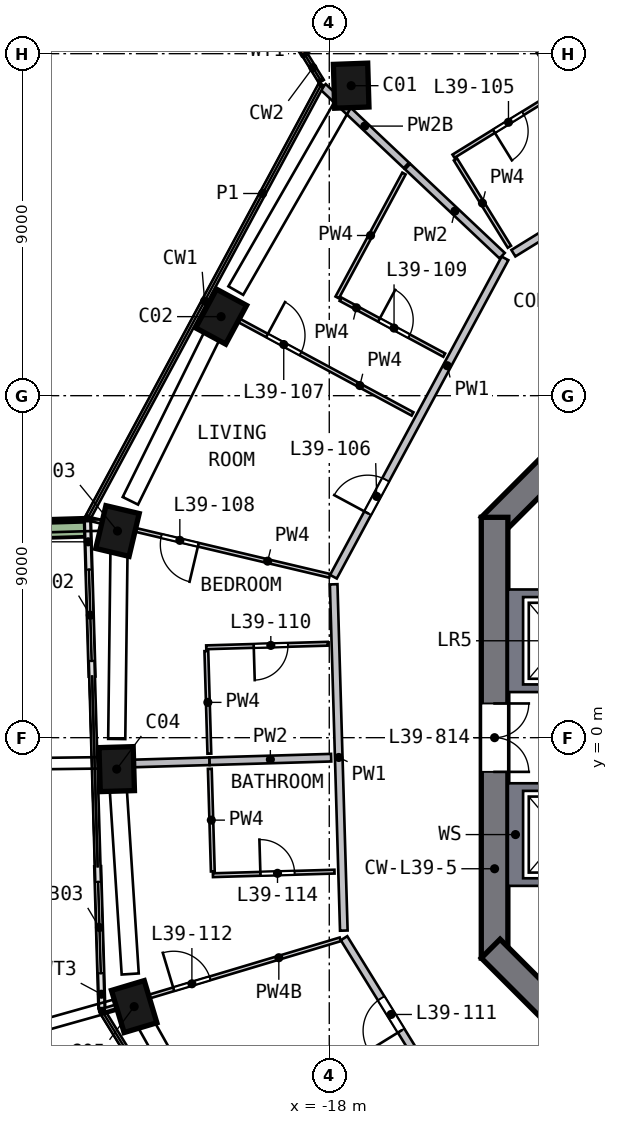
"""IFC4 building model, lengths in metres.
Left out: names, types, materials, properties, quantities, classifications, styles, units other than length and angle.
Written with IfcOpenShell. Run it as: python <this file> out.ifc"""

import sys

from ifc_helpers import new_model, si_unit, direction, frame, frame_2d, origin, origin_2d, place, context, subcontext, project, spatial, polyline, rectangle, outline, extrude, element, fill, save


model = new_model("IFC4")
c1 = context("Model", 3, precision=1e-05, world=origin(), true_north=direction((0.0, 1.0)))
c2 = subcontext(c1, "Body", "Model", "MODEL_VIEW")
j1 = project(units=[si_unit("LENGTHUNIT", "METRE"), si_unit("PLANEANGLEUNIT", "RADIAN")], contexts=[c1])
p1 = place(None, origin())
s1 = spatial("IfcSite", under=j1, at=p1, CompositionType="ELEMENT")
p2 = place(p1, origin())
s2 = spatial("IfcBuilding", under=s1, at=p2, CompositionType="ELEMENT")
p3 = place(p2, frame((0.0, 0.0, 162.0)))
s3 = spatial("IfcBuildingStorey", under=s2, at=p3, CompositionType="ELEMENT", Elevation=162.0)
p4 = place(p3, frame((-17.325, 17.258, 0.0), z_axis=(-0.081337026, -0.083009376, 0.993223908), x_axis=(-0.035851869, 0.996124497, 0.080315816)))
e1 = element("IfcColumn", 1, at=p4, inside=s3, PredefinedType="COLUMN", context=c2, shape_type="SweptSolid", body=[
    extrude(rectangle(XDim=1.15, YDim=0.9, at=origin_2d()), origin(), (0.0, 0.0, 1.0), 3.212),
])
p5 = place(p3, frame((-20.783, 11.2, 0.0), z_axis=(-0.052474579, -0.09932145, 0.993670805), x_axis=(-0.471622943, -0.874616696, -0.112327356)))
e2 = element("IfcColumn", 2, at=p5, inside=s3, PredefinedType="COLUMN", context=c2, shape_type="SweptSolid", body=[
    extrude(rectangle(XDim=1.15, YDim=0.9, at=origin_2d()), origin(), (0.0, 0.0, 1.0), 3.21),
])
p6 = place(p3, frame((-23.542, 5.574, 0.0), z_axis=(-0.025544734, -0.112214366, 0.993355627), x_axis=(0.228704033, 0.966669959, 0.115081082)))
e3 = element("IfcColumn", 3, at=p6, inside=s3, PredefinedType="COLUMN", context=c2, shape_type="SweptSolid", body=[
    extrude(rectangle(XDim=1.15, YDim=0.9, at=origin_2d()), origin(), (0.0, 0.0, 1.0), 3.211),
])
p7 = place(p3, frame((-23.598, -0.692, 0.0), z_axis=(0.004182758, -0.112250014, 0.993671193), x_axis=(0.02857431, -0.993260713, -0.112323925)))
e4 = element("IfcColumn", 4, at=p7, inside=s3, PredefinedType="COLUMN", context=c2, shape_type="SweptSolid", body=[
    extrude(rectangle(XDim=1.15, YDim=0.9, at=origin_2d()), origin(), (0.0, 0.0, 1.0), 3.21),
])
p8 = place(p3, frame((-23.175, -6.944, 0.0), z_axis=(0.033983692, -0.109933824, 0.993357772), x_axis=(-0.285309883, 0.951503482, 0.115062571)))
e5 = element("IfcColumn", 5, at=p8, inside=s3, PredefinedType="COLUMN", context=c2, shape_type="SweptSolid", body=[
    extrude(rectangle(XDim=1.15, YDim=0.9, at=origin_2d()), origin(), (0.0, 0.0, 1.0), 3.211),
])
p9 = place(p3, frame((-5.552, 13.752, 0.0), z_axis=(0.0, 0.0, 1.0), x_axis=(-0.707106781, -0.707106781, 0.0)))
e6 = element("IfcWall", 6, at=p9, inside=s3, PredefinedType="SHEAR", context=c2, shape_type="SweptSolid", body=[
    extrude(rectangle(XDim=11.598, YDim=0.7, at=frame_2d((5.799, 0.0))), origin(), (0.0, 0.0, 1.0), 3.5),
])
p10 = place(p3, frame((-13.65, 5.799, 0.0), z_axis=(0.0, 0.0, 1.0), x_axis=(0.0, -1.0, 0.0)))
e7 = element("IfcWall", 7, at=p10, inside=s3, PredefinedType="SHEAR", context=c2, shape_type="SweptSolid", body=[
    extrude(rectangle(XDim=11.598, YDim=0.7, at=frame_2d((5.799, 0.0))), origin(), (0.0, 0.0, 1.0), 3.5),
])
p11 = place(p10, frame((4.899, 0.0, 0.0)))
e8 = element("IfcOpeningElement", 8, at=p11, cuts=e7, PredefinedType="OPENING", context=c2, shape_type="SweptSolid", body=[
    extrude(rectangle(XDim=1.8, YDim=2.1, at=frame_2d((0.9, 1.05))), frame((0.0, 0.36, 0.0), z_axis=(0.0, -1.0, 0.0), x_axis=(1.0, 0.0, 0.0)), (0.0, 0.0, 1.0), 0.72),
])
p12 = place(p3, frame((-13.752, -5.552, 0.0), z_axis=(0.0, 0.0, 1.0), x_axis=(0.707106781, -0.707106781, 0.0)))
e9 = element("IfcWall", 9, at=p12, inside=s3, PredefinedType="SHEAR", context=c2, shape_type="SweptSolid", body=[
    extrude(rectangle(XDim=11.598, YDim=0.7, at=frame_2d((5.799, 0.0))), origin(), (0.0, 0.0, 1.0), 3.5),
])
p13 = place(p12, frame((2.099, 0.0, 0.0)))
e10 = element("IfcOpeningElement", 10, at=p13, cuts=e9, PredefinedType="OPENING", context=c2, shape_type="SweptSolid", body=[
    extrude(rectangle(XDim=1.2, YDim=2.1, at=frame_2d((0.6, 1.05))), frame((0.0, 0.36, 0.0), z_axis=(0.0, -1.0, 0.0), x_axis=(1.0, 0.0, 0.0)), (0.0, 0.0, 1.0), 0.72),
])
p14 = place(p3, frame((-17.161, 19.002, 0.0), z_axis=(0.0, 0.0, 1.0), x_axis=(-0.851027347, -0.525121372, 0.0)))
e11 = element("IfcWall", 11, at=p14, inside=s3, PredefinedType="SOLIDWALL", context=c2, shape_type="SweptSolid", body=[
    extrude(rectangle(XDim=1.875, YDim=0.15, at=frame_2d((0.938, 0.0))), origin(), (0.0, 0.0, 1.0), 3.19),
])
p15 = place(p3, frame((-24.361, 5.688, 0.0), z_axis=(0.0, 0.0, 1.0), x_axis=(0.029349666, -0.999569206, 0.0)))
e12 = element("IfcWall", 12, at=p15, inside=s3, PredefinedType="SOLIDWALL", context=c2, shape_type="SweptSolid", body=[
    extrude(rectangle(XDim=4.068, YDim=0.15, at=frame_2d((2.034, 0.0))), origin(), (0.0, 0.0, 1.0), 2.475),
])
p16 = place(p15, frame((1.268, 0.0, 0.0)))
e13 = element("IfcOpeningElement", 13, at=p16, cuts=e12, PredefinedType="OPENING", context=c2, shape_type="SweptSolid", body=[
    extrude(rectangle(XDim=2.4, YDim=2.4, at=frame_2d((1.2, 1.2))), frame((0.0, 0.085, 0.0), z_axis=(0.0, -1.0, 0.0), x_axis=(1.0, 0.0, 0.0)), (0.0, 0.0, 1.0), 0.17),
])
p17 = place(p3, frame((-24.094, -3.397, 0.0), z_axis=(0.0, 0.0, 1.0), x_axis=(0.029283026, -0.99957116, 0.0)))
e14 = element("IfcWall", 14, at=p17, inside=s3, PredefinedType="SOLIDWALL", context=c2, shape_type="SweptSolid", body=[
    extrude(rectangle(XDim=3.71, YDim=0.15, at=frame_2d((1.855, 0.0))), origin(), (0.0, 0.0, 1.0), 2.475),
])
p18 = place(p17, frame((0.4, 0.0, 0.0)))
e15 = element("IfcOpeningElement", 15, at=p18, cuts=e14, PredefinedType="OPENING", context=c2, shape_type="SweptSolid", body=[
    extrude(rectangle(XDim=2.4, YDim=2.4, at=frame_2d((1.2, 1.2))), frame((0.0, 0.085, 0.0), z_axis=(0.0, -1.0, 0.0), x_axis=(1.0, 0.0, 0.0)), (0.0, 0.0, 1.0), 0.17),
])
p19 = place(p3, frame((-24.432, 5.536, 0.0), z_axis=(0.0, 0.0, 1.0), x_axis=(-0.99957052, -0.029304862, 0.0)))
e16 = element("IfcWall", 16, at=p19, inside=s3, PredefinedType="SOLIDWALL", context=c2, shape_type="SweptSolid", body=[
    extrude(rectangle(XDim=3.199, YDim=0.5, at=frame_2d((1.6, 0.0))), origin(), (0.0, 0.0, 1.0), 0.7),
])
p20 = place(p3, frame((-26.948, -8.142, 0.0), z_axis=(0.0, 0.0, 1.0), x_axis=(0.525181892, -0.85099, 0.0)))
e17 = element("IfcWall", 17, at=p20, inside=s3, PredefinedType="SOLIDWALL", context=c2, shape_type="SweptSolid", body=[
    extrude(rectangle(XDim=13.723, YDim=0.5, at=frame_2d((6.862, 0.0))), origin(), (0.0, 0.0, 1.0), 0.7),
])
p21 = place(p3, origin())
e18 = element("IfcWall", 18, at=p21, inside=s3, PredefinedType="SOLIDWALL", context=c2, shape_type="SweptSolid", body=[
    extrude(outline(polyline([(-13.3, 3.9), (-10.9, 3.9), (-10.9, 3.7), (-12.9, 3.7), (-12.9, 1.4), (-10.9, 1.4), (-10.9, 1.2), (-13.3, 1.2), (-13.3, 3.9)])), origin(), (0.0, 0.0, 1.0), 3.19),
])
p22 = place(p3, origin())
e19 = element("IfcWall", 19, at=p22, inside=s3, PredefinedType="SOLIDWALL", context=c2, shape_type="SweptSolid", body=[
    extrude(outline(polyline([(-13.3, -3.9), (-13.3, -1.2), (-10.9, -1.2), (-10.9, -1.4), (-12.9, -1.4), (-12.9, -3.7), (-10.9, -3.7), (-10.9, -3.9), (-13.3, -3.9)])), origin(), (0.0, 0.0, 1.0), 3.19),
])
p23 = place(p3, frame((-17.884, 4.036, 0.0), z_axis=(0.0, 0.0, 1.0), x_axis=(0.029297532, -0.999570735, 0.0)))
e20 = element("IfcWall", 20, at=p23, inside=s3, PredefinedType="SOLIDWALL", context=c2, shape_type="SweptSolid", body=[
    extrude(rectangle(XDim=9.116, YDim=0.2, at=frame_2d((4.558, 0.0))), origin(), (0.0, 0.0, 1.0), 3.19),
])
p24 = place(p3, frame((-17.89, 4.236, 0.0), z_axis=(0.0, 0.0, 1.0), x_axis=(0.474391993, 0.880313715, 0.0)))
e21 = element("IfcWall", 21, at=p24, inside=s3, PredefinedType="SOLIDWALL", context=c2, shape_type="SweptSolid", body=[
    extrude(rectangle(XDim=9.517, YDim=0.2, at=frame_2d((4.758, 0.0))), origin(), (0.0, 0.0, 1.0), 3.19),
])
p25 = place(p24, frame((1.9, 0.0, 0.0)))
e22 = element("IfcOpeningElement", 22, at=p25, cuts=e21, PredefinedType="OPENING", context=c2, shape_type="SweptSolid", body=[
    extrude(rectangle(XDim=1.0, YDim=2.1, at=frame_2d((0.5, 1.05))), frame((0.0, 0.11, 0.0), z_axis=(0.0, -1.0, 0.0), x_axis=(1.0, 0.0, 0.0)), (0.0, 0.0, 1.0), 0.22),
])
p26 = place(p3, frame((-12.613, -13.375, 0.0), z_axis=(0.0, 0.0, 1.0), x_axis=(-0.525166229, 0.850999666, 0.0)))
e23 = element("IfcWall", 23, at=p26, inside=s3, PredefinedType="SOLIDWALL", context=c2, shape_type="SweptSolid", body=[
    extrude(rectangle(XDim=9.517, YDim=0.2, at=frame_2d((4.758, 0.0))), origin(), (0.0, 0.0, 1.0), 3.19),
])
p27 = place(p26, frame((6.658, 0.0, 0.0)))
e24 = element("IfcOpeningElement", 24, at=p27, cuts=e23, PredefinedType="OPENING", context=c2, shape_type="SweptSolid", body=[
    extrude(rectangle(XDim=1.0, YDim=2.1, at=frame_2d((0.5, 1.05))), frame((0.0, 0.11, 0.0), z_axis=(0.0, -1.0, 0.0), x_axis=(1.0, 0.0, 0.0)), (0.0, 0.0, 1.0), 0.22),
])
p28 = place(p3, frame((-14.201, 20.917, 0.0), z_axis=(0.0, 0.0, 1.0), x_axis=(0.525162469, -0.851001986, 0.0)))
e25 = element("IfcWall", 25, at=p28, inside=s3, PredefinedType="SOLIDWALL", context=c2, shape_type="SweptSolid", body=[
    extrude(rectangle(XDim=7.3, YDim=0.2, at=frame_2d((3.65, 0.0))), origin(), (0.0, 0.0, 1.0), 3.19),
])
p29 = place(p3, frame((-10.262, 14.534, 0.0), z_axis=(0.0, 0.0, 1.0), x_axis=(-0.851033965, -0.525110647, 0.0)))
e26 = element("IfcWall", 26, at=p29, inside=s3, PredefinedType="SOLIDWALL", context=c2, shape_type="SweptSolid", body=[
    extrude(rectangle(XDim=3.4, YDim=0.2, at=frame_2d((1.7, 0.0))), origin(), (0.0, 0.0, 1.0), 3.19),
])
p30 = place(p3, frame((-21.149, -0.62, 0.0), z_axis=(0.0, 0.0, 1.0), x_axis=(-0.999570753, -0.029296907, 0.0)))
e27 = element("IfcWall", 27, at=p30, inside=s3, PredefinedType="SOLIDWALL", context=c2, shape_type="SweptSolid", body=[
    extrude(rectangle(XDim=2.95, YDim=0.2, at=frame_2d((1.475, 0.0))), origin(), (0.0, 0.0, 1.0), 3.19),
])
p31 = place(p3, frame((-17.951, -0.527, 0.0), z_axis=(0.0, 0.0, 1.0), x_axis=(-0.999570717, -0.029298157, 0.0)))
e28 = element("IfcWall", 28, at=p31, inside=s3, PredefinedType="SOLIDWALL", context=c2, shape_type="SweptSolid", body=[
    extrude(rectangle(XDim=3.2, YDim=0.2, at=frame_2d((1.6, 0.0))), origin(), (0.0, 0.0, 1.0), 3.19),
])
p32 = place(p3, frame((-15.971, 15.061, 0.0), z_axis=(0.0, 0.0, 1.0), x_axis=(-0.727516566, 0.686090115, 0.0)))
e29 = element("IfcWall", 29, at=p32, inside=s3, PredefinedType="SOLIDWALL", context=c2, shape_type="SweptSolid", body=[
    extrude(rectangle(XDim=3.011, YDim=0.2, at=frame_2d((1.506, 0.0))), origin(), (0.0, 0.0, 1.0), 2.69),
])
p33 = place(p3, frame((-13.451, 12.684, 0.0), z_axis=(0.0, 0.0, 1.0), x_axis=(-0.727549683, 0.686054997, 0.0)))
e30 = element("IfcWall", 30, at=p33, inside=s3, PredefinedType="SOLIDWALL", context=c2, shape_type="SweptSolid", body=[
    extrude(rectangle(XDim=3.418, YDim=0.2, at=frame_2d((1.709, 0.0))), origin(), (0.0, 0.0, 1.0), 3.19),
])
p34 = place(p3, frame((-21.234, 2.278, 0.0), z_axis=(0.0, 0.0, 1.0), x_axis=(0.029388422, -0.999568067, 0.0)))
e31 = element("IfcWall", 31, at=p34, inside=s3, PredefinedType="PARTITIONING", context=c2, shape_type="SweptSolid", body=[
    extrude(rectangle(XDim=2.7, YDim=0.1, at=frame_2d((1.35, 0.0))), origin(), (0.0, 0.0, 1.0), 3.19),
])
p35 = place(p3, frame((-17.991, 4.26, 0.0), z_axis=(0.0, 0.0, 1.0), x_axis=(-0.973098307, 0.230390289, 0.0)))
e32 = element("IfcWall", 32, at=p35, inside=s3, PredefinedType="PARTITIONING", context=c2, shape_type="SweptSolid", body=[
    extrude(rectangle(XDim=6.476, YDim=0.1, at=frame_2d((3.238, 0.0))), origin(), (0.0, 0.0, 1.0), 3.19),
])
p36 = place(p35, frame((3.55, 0.0, 0.0)))
e33 = element("IfcOpeningElement", 33, at=p36, cuts=e32, PredefinedType="OPENING", context=c2, shape_type="SweptSolid", body=[
    extrude(rectangle(XDim=1.0, YDim=2.1, at=frame_2d((0.5, 1.05))), frame((0.0, 0.06, 0.0), z_axis=(0.0, -1.0, 0.0), x_axis=(1.0, 0.0, 0.0)), (0.0, 0.0, 1.0), 0.12),
])
p37 = place(p3, frame((-21.143, -0.82, 0.0), z_axis=(0.0, 0.0, 1.0), x_axis=(0.029298074, -0.999570719, 0.0)))
e34 = element("IfcWall", 34, at=p37, inside=s3, PredefinedType="PARTITIONING", context=c2, shape_type="SweptSolid", body=[
    extrude(rectangle(XDim=2.7, YDim=0.1, at=frame_2d((1.35, 0.0))), origin(), (0.0, 0.0, 1.0), 3.19),
])
p38 = place(p3, frame((-23.914, -7.165, 0.0), z_axis=(0.0, 0.0, 1.0), x_axis=(0.957926876, 0.28701237, 0.0)))
e35 = element("IfcWall", 35, at=p38, inside=s3, PredefinedType="PARTITIONING", context=c2, shape_type="SweptSolid", body=[
    extrude(rectangle(XDim=6.476, YDim=0.1, at=frame_2d((3.238, 0.0))), origin(), (0.0, 0.0, 1.0), 2.69),
])
p39 = place(p38, frame((1.9, 0.0, 0.0)))
e36 = element("IfcOpeningElement", 36, at=p39, cuts=e35, PredefinedType="OPENING", context=c2, shape_type="SweptSolid", body=[
    extrude(rectangle(XDim=1.0, YDim=2.1, at=frame_2d((0.5, 1.05))), frame((0.0, 0.06, 0.0), z_axis=(0.0, -1.0, 0.0), x_axis=(1.0, 0.0, 0.0)), (0.0, 0.0, 1.0), 0.12),
])
p40 = place(p3, frame((-18.039, 2.472, 0.0), z_axis=(0.0, 0.0, 1.0), x_axis=(-0.999570782, -0.029295923, 0.0)))
e37 = element("IfcWall", 37, at=p40, inside=s3, PredefinedType="PARTITIONING", context=c2, shape_type="SweptSolid", body=[
    extrude(rectangle(XDim=3.2, YDim=0.1, at=frame_2d((1.6, 0.0))), origin(), (0.0, 0.0, 1.0), 3.19),
])
p41 = place(p40, frame((1.05, 0.0, 0.0)))
e38 = element("IfcOpeningElement", 38, at=p41, cuts=e37, PredefinedType="OPENING", context=c2, shape_type="SweptSolid", body=[
    extrude(rectangle(XDim=0.9, YDim=2.1, at=frame_2d((0.45, 1.05))), frame((0.0, 0.06, 0.0), z_axis=(0.0, -1.0, 0.0), x_axis=(1.0, 0.0, 0.0)), (0.0, 0.0, 1.0), 0.12),
])
p42 = place(p3, frame((-21.061, -3.619, 0.0), z_axis=(0.0, 0.0, 1.0), x_axis=(0.999570717, 0.029298157, 0.0)))
e39 = element("IfcWall", 39, at=p42, inside=s3, PredefinedType="PARTITIONING", context=c2, shape_type="SweptSolid", body=[
    extrude(rectangle(XDim=3.2, YDim=0.1, at=frame_2d((1.6, 0.0))), origin(), (0.0, 0.0, 1.0), 3.19),
])
p43 = place(p42, frame((1.25, 0.0, 0.0)))
e40 = element("IfcOpeningElement", 40, at=p43, cuts=e39, PredefinedType="OPENING", context=c2, shape_type="SweptSolid", body=[
    extrude(rectangle(XDim=0.9, YDim=2.1, at=frame_2d((0.45, 1.05))), frame((0.0, 0.06, 0.0), z_axis=(0.0, -1.0, 0.0), x_axis=(1.0, 0.0, 0.0)), (0.0, 0.0, 1.0), 0.12),
])
p44 = place(p3, frame((-21.223, 11.437, 0.0), z_axis=(0.0, 0.0, 1.0), x_axis=(0.880304066, -0.474409898, 0.0)))
e41 = element("IfcWall", 41, at=p44, inside=s3, PredefinedType="PARTITIONING", context=c2, shape_type="SweptSolid", body=[
    extrude(rectangle(XDim=6.15, YDim=0.1, at=frame_2d((3.075, 0.0))), origin(), (0.0, 0.0, 1.0), 3.19),
])
p45 = place(p44, frame((1.8, 0.0, 0.0)))
e42 = element("IfcOpeningElement", 42, at=p45, cuts=e41, PredefinedType="OPENING", context=c2, shape_type="SweptSolid", body=[
    extrude(rectangle(XDim=1.0, YDim=2.1, at=frame_2d((0.5, 1.05))), frame((0.0, 0.06, 0.0), z_axis=(0.0, -1.0, 0.0), x_axis=(1.0, 0.0, 0.0)), (0.0, 0.0, 1.0), 0.12),
])
p46 = place(p3, frame((-16.035, 14.846, 0.0), z_axis=(0.0, 0.0, 1.0), x_axis=(-0.474371009, -0.880325023, 0.0)))
e43 = element("IfcWall", 43, at=p46, inside=s3, PredefinedType="PARTITIONING", context=c2, shape_type="SweptSolid", body=[
    extrude(rectangle(XDim=3.704, YDim=0.1, at=frame_2d((1.852, 0.0))), origin(), (0.0, 0.0, 1.0), 3.19),
])
p47 = place(p3, frame((-17.704, 11.538, 0.0), z_axis=(0.0, 0.0, 1.0), x_axis=(0.880304146, -0.474409749, 0.0)))
e44 = element("IfcWall", 44, at=p47, inside=s3, PredefinedType="PARTITIONING", context=c2, shape_type="SweptSolid", body=[
    extrude(rectangle(XDim=3.1, YDim=0.1, at=frame_2d((1.55, 0.0))), origin(), (0.0, 0.0, 1.0), 3.19),
])
p48 = place(p47, frame((1.15, 0.0, 0.0)))
e45 = element("IfcOpeningElement", 45, at=p48, cuts=e44, PredefinedType="OPENING", context=c2, shape_type="SweptSolid", body=[
    extrude(rectangle(XDim=0.9, YDim=2.1, at=frame_2d((0.45, 1.05))), frame((0.0, 0.06, 0.0), z_axis=(0.0, -1.0, 0.0), x_axis=(1.0, 0.0, 0.0)), (0.0, 0.0, 1.0), 0.12),
])
p49 = place(p3, frame((-14.679, 15.217, 0.0), z_axis=(0.0, 0.0, 1.0), x_axis=(0.52518675, -0.850987002, 0.0)))
e46 = element("IfcWall", 46, at=p49, inside=s3, PredefinedType="PARTITIONING", context=c2, shape_type="SweptSolid", body=[
    extrude(rectangle(XDim=2.7, YDim=0.1, at=frame_2d((1.35, 0.0))), origin(), (0.0, 0.0, 1.0), 3.19),
])
p50 = place(p3, frame((-12.008, 16.982, 0.0), z_axis=(0.0, 0.0, 1.0), x_axis=(-0.851010621, -0.525148476, 0.0)))
e47 = element("IfcWall", 47, at=p50, inside=s3, PredefinedType="PARTITIONING", context=c2, shape_type="SweptSolid", body=[
    extrude(rectangle(XDim=3.2, YDim=0.1, at=frame_2d((1.6, 0.0))), origin(), (0.0, 0.0, 1.0), 3.19),
])
p51 = place(p50, frame((1.05, 0.0, 0.0)))
e48 = element("IfcOpeningElement", 48, at=p51, cuts=e47, PredefinedType="OPENING", context=c2, shape_type="SweptSolid", body=[
    extrude(rectangle(XDim=0.9, YDim=2.1, at=frame_2d((0.45, 1.05))), frame((0.0, 0.06, 0.0), z_axis=(0.0, -1.0, 0.0), x_axis=(1.0, 0.0, 0.0)), (0.0, 0.0, 1.0), 0.12),
])
p52 = place(p16, origin())
e49 = element("IfcDoor", 49, at=p52, inside=s3, OperationType="SLIDING_TO_LEFT", PredefinedType="DOOR", context=c2, shape_type="SweptSolid", body=[
    extrude(rectangle(XDim=2.4, YDim=2.4, at=frame_2d((1.2, 1.2))), frame((0.0, 0.025, 0.0), z_axis=(0.0, -1.0, 0.0), x_axis=(1.0, 0.0, 0.0)), (0.0, 0.0, 1.0), 0.05),
])
fill(e13, e49)
p53 = place(p18, origin())
e50 = element("IfcDoor", 50, at=p53, inside=s3, OperationType="SLIDING_TO_RIGHT", PredefinedType="DOOR", context=c2, shape_type="SweptSolid", body=[
    extrude(rectangle(XDim=2.4, YDim=2.4, at=frame_2d((1.2, 1.2))), frame((0.0, 0.025, 0.0), z_axis=(0.0, -1.0, 0.0), x_axis=(1.0, 0.0, 0.0)), (0.0, 0.0, 1.0), 0.05),
])
fill(e15, e50)
p54 = place(p11, origin())
e51 = element("IfcDoor", 51, at=p54, inside=s3, OperationType="DOUBLE_DOOR_SINGLE_SWING", PredefinedType="DOOR", context=c2, shape_type="SweptSolid", body=[
    extrude(rectangle(XDim=1.8, YDim=2.1, at=frame_2d((0.9, 1.05))), frame((0.0, 0.025, 0.0), z_axis=(0.0, -1.0, 0.0), x_axis=(1.0, 0.0, 0.0)), (0.0, 0.0, 1.0), 0.05),
])
fill(e8, e51)
p55 = place(p51, origin())
e52 = element("IfcDoor", 52, at=p55, inside=s3, OperationType="SINGLE_SWING_RIGHT", PredefinedType="DOOR", context=c2, shape_type="SweptSolid", body=[
    extrude(rectangle(XDim=0.9, YDim=2.1, at=frame_2d((0.45, 1.05))), frame((0.0, 0.025, 0.0), z_axis=(0.0, -1.0, 0.0), x_axis=(1.0, 0.0, 0.0)), (0.0, 0.0, 1.0), 0.05),
])
fill(e48, e52)
p56 = place(p25, origin())
e53 = element("IfcDoor", 53, at=p56, inside=s3, OperationType="SINGLE_SWING_LEFT", PredefinedType="DOOR", context=c2, shape_type="SweptSolid", body=[
    extrude(rectangle(XDim=1.0, YDim=2.1, at=frame_2d((0.5, 1.05))), frame((0.0, 0.025, 0.0), z_axis=(0.0, -1.0, 0.0), x_axis=(1.0, 0.0, 0.0)), (0.0, 0.0, 1.0), 0.05),
])
fill(e22, e53)
p57 = place(p45, origin())
e54 = element("IfcDoor", 54, at=p57, inside=s3, OperationType="SINGLE_SWING_LEFT", PredefinedType="DOOR", context=c2, shape_type="SweptSolid", body=[
    extrude(rectangle(XDim=1.0, YDim=2.1, at=frame_2d((0.5, 1.05))), frame((0.0, 0.025, 0.0), z_axis=(0.0, -1.0, 0.0), x_axis=(1.0, 0.0, 0.0)), (0.0, 0.0, 1.0), 0.05),
])
fill(e42, e54)
p58 = place(p36, origin())
e55 = element("IfcDoor", 55, at=p58, inside=s3, OperationType="SINGLE_SWING_LEFT", PredefinedType="DOOR", context=c2, shape_type="SweptSolid", body=[
    extrude(rectangle(XDim=1.0, YDim=2.1, at=frame_2d((0.5, 1.05))), frame((0.0, 0.025, 0.0), z_axis=(0.0, -1.0, 0.0), x_axis=(1.0, 0.0, 0.0)), (0.0, 0.0, 1.0), 0.05),
])
fill(e33, e55)
p59 = place(p48, origin())
e56 = element("IfcDoor", 56, at=p59, inside=s3, OperationType="SINGLE_SWING_LEFT", PredefinedType="DOOR", context=c2, shape_type="SweptSolid", body=[
    extrude(rectangle(XDim=0.9, YDim=2.1, at=frame_2d((0.45, 1.05))), frame((0.0, 0.025, 0.0), z_axis=(0.0, -1.0, 0.0), x_axis=(1.0, 0.0, 0.0)), (0.0, 0.0, 1.0), 0.05),
])
fill(e45, e56)
p60 = place(p41, origin())
e57 = element("IfcDoor", 57, at=p60, inside=s3, OperationType="SINGLE_SWING_RIGHT", PredefinedType="DOOR", context=c2, shape_type="SweptSolid", body=[
    extrude(rectangle(XDim=0.9, YDim=2.1, at=frame_2d((0.45, 1.05))), frame((0.0, 0.025, 0.0), z_axis=(0.0, -1.0, 0.0), x_axis=(1.0, 0.0, 0.0)), (0.0, 0.0, 1.0), 0.05),
])
fill(e38, e57)
p61 = place(p27, origin())
e58 = element("IfcDoor", 58, at=p61, inside=s3, OperationType="SINGLE_SWING_LEFT", PredefinedType="DOOR", context=c2, shape_type="SweptSolid", body=[
    extrude(rectangle(XDim=1.0, YDim=2.1, at=frame_2d((0.5, 1.05))), frame((0.0, 0.025, 0.0), z_axis=(0.0, -1.0, 0.0), x_axis=(1.0, 0.0, 0.0)), (0.0, 0.0, 1.0), 0.05),
])
fill(e24, e58)
p62 = place(p39, origin())
e59 = element("IfcDoor", 59, at=p62, inside=s3, OperationType="SINGLE_SWING_LEFT", PredefinedType="DOOR", context=c2, shape_type="SweptSolid", body=[
    extrude(rectangle(XDim=1.0, YDim=2.1, at=frame_2d((0.5, 1.05))), frame((0.0, 0.025, 0.0), z_axis=(0.0, -1.0, 0.0), x_axis=(1.0, 0.0, 0.0)), (0.0, 0.0, 1.0), 0.05),
])
fill(e36, e59)
p63 = place(p43, origin())
e60 = element("IfcDoor", 60, at=p63, inside=s3, OperationType="SINGLE_SWING_LEFT", PredefinedType="DOOR", context=c2, shape_type="SweptSolid", body=[
    extrude(rectangle(XDim=0.9, YDim=2.1, at=frame_2d((0.45, 1.05))), frame((0.0, 0.025, 0.0), z_axis=(0.0, -1.0, 0.0), x_axis=(1.0, 0.0, 0.0)), (0.0, 0.0, 1.0), 0.05),
])
fill(e40, e60)
save(model, sys.argv[1])
